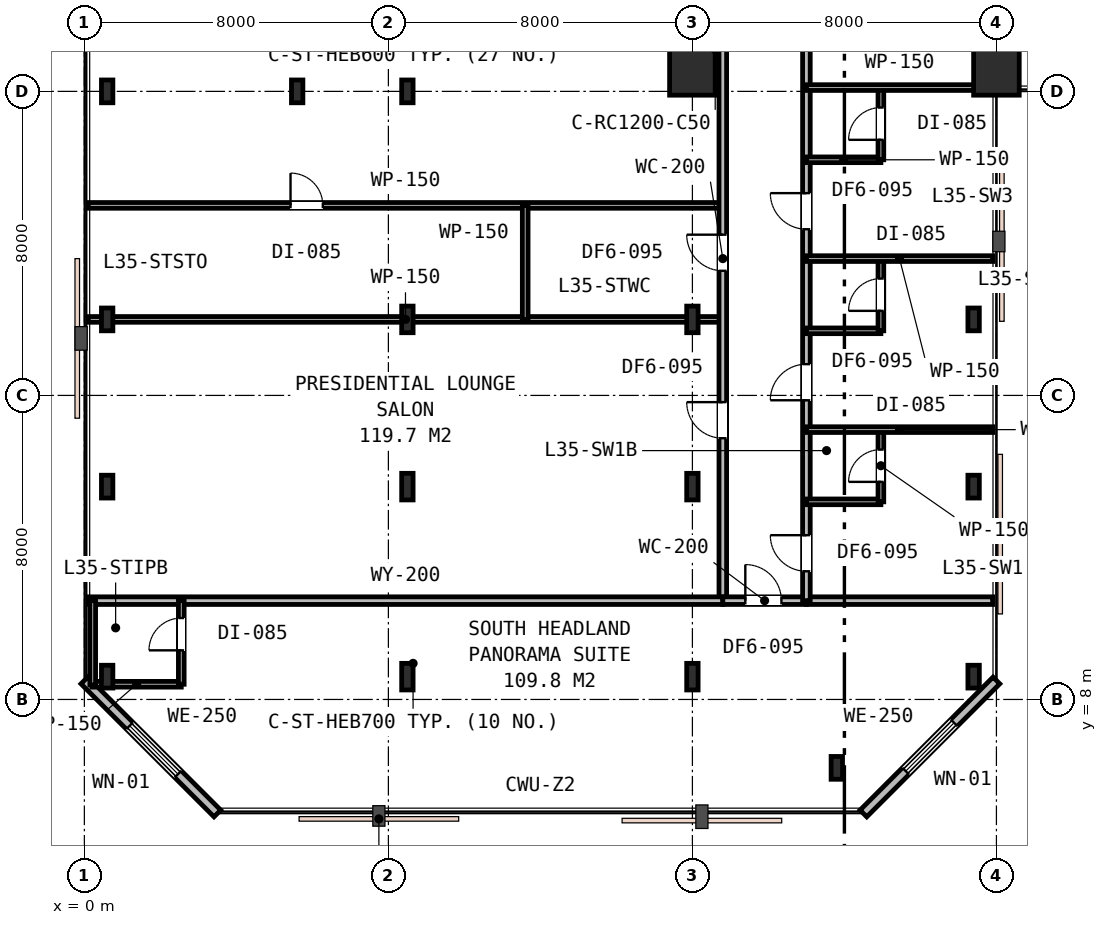
"""IFC4 building model, lengths in metres.
Left out: names, types, materials, properties, quantities, classifications, styles, units other than length and angle.
Written with IfcOpenShell. Run it as: python <this file> out.ifc"""

import sys

from ifc_helpers import new_model, si_unit, direction, frame, frame_2d, origin, origin_2d, place, context, subcontext, project, spatial, rectangle, i_section, extrude, element, fill, save


model = new_model("IFC4")
c1 = context("Model", 3, precision=1e-05, world=origin(), true_north=direction((0.0, 1.0)))
c2 = subcontext(c1, "Body", "Model", "MODEL_VIEW")
j1 = project(units=[si_unit("LENGTHUNIT", "METRE"), si_unit("PLANEANGLEUNIT", "RADIAN")], contexts=[c1])
p1 = place(None, origin())
s1 = spatial("IfcSite", under=j1, at=p1, CompositionType="ELEMENT")
p2 = place(p1, origin())
s2 = spatial("IfcBuilding", under=s1, at=p2, CompositionType="ELEMENT")
p3 = place(p2, frame((0.0, 0.0, 136.8)))
s3 = spatial("IfcBuildingStorey", under=s2, at=p3, CompositionType="ELEMENT", Elevation=136.8)
p4 = place(p3, frame((8.5, 24.0, 0.0), z_axis=(0.0, 0.0, 1.0), x_axis=(1.0, 0.0, 0.0)))
e1 = element("IfcColumn", 1, at=p4, inside=s3, PredefinedType="COLUMN", context=c2, shape_type="SweptSolid", body=[
    extrude(i_section(OverallWidth=0.3, OverallDepth=0.6, WebThickness=0.015, FlangeThickness=0.03, FilletRadius=0.027, at=origin_2d()), origin(), (0.0, 0.0, 1.0), 3.6),
])
for number, where, z_axis, x_axis in (
    (2, (16.0, 24.5, 0.0), (0.0, 0.0, 1.0), (1.0, 0.0, 0.0)),
    (3, (24.0, 24.5, 0.0), (0.0, 0.0, 1.0), (1.0, 0.0, 0.0)),
):
    element("IfcColumn", number, at=place(p3, frame(where, z_axis=z_axis, x_axis=x_axis)), inside=s3, PredefinedType="COLUMN", context=c2, shape_type="SweptSolid", body=[
        extrude(rectangle(XDim=1.2, YDim=1.2, at=origin_2d()), origin(), (0.0, 0.0, 1.0), 3.6),
    ])
for number, where, z_axis, x_axis in (
    (4, (5.6, 24.0, 0.0), (0.0, 0.0, 1.0), (1.0, 0.0, 0.0)),
    (5, (0.6, 24.0, 0.0), (0.0, 0.0, 1.0), (1.0, 0.0, 0.0)),
    (6, (0.6, 8.6, 0.0), (0.0, 0.0, 1.0), (1.0, 0.0, 0.0)),
    (7, (0.6, 13.6, 0.0), (0.0, 0.0, 1.0), (1.0, 0.0, 0.0)),
    (8, (0.6, 18.0, 0.0), (0.0, 0.0, 1.0), (1.0, 0.0, 0.0)),
    (9, (19.8, 6.2, 0.0), (0.0, 0.0, 1.0), (1.0, 0.0, 0.0)),
    (10, (23.4, 8.6, 0.0), (0.0, 0.0, 1.0), (1.0, 0.0, 0.0)),
    (11, (23.4, 13.6, 0.0), (0.0, 0.0, 1.0), (1.0, 0.0, 0.0)),
    (12, (23.4, 18.0, 0.0), (0.0, 0.0, 1.0), (1.0, 0.0, 0.0)),
):
    element("IfcColumn", number, at=place(p3, frame(where, z_axis=z_axis, x_axis=x_axis)), inside=s3, PredefinedType="COLUMN", context=c2, shape_type="SweptSolid", body=[
        extrude(i_section(OverallWidth=0.3, OverallDepth=0.6, WebThickness=0.015, FlangeThickness=0.03, FilletRadius=0.027, at=origin_2d()), origin(), (0.0, 0.0, 1.0), 3.6),
    ])
for number, where, z_axis, x_axis in (
    (13, (8.5, 8.6, 0.0), (0.0, 0.0, 1.0), (1.0, 0.0, 0.0)),
    (14, (16.0, 8.6, 0.0), (0.0, 0.0, 1.0), (1.0, 0.0, 0.0)),
    (15, (8.5, 13.6, 0.0), (0.0, 0.0, 1.0), (1.0, 0.0, 0.0)),
    (16, (16.0, 13.6, 0.0), (0.0, 0.0, 1.0), (1.0, 0.0, 0.0)),
    (17, (8.5, 18.0, 0.0), (0.0, 0.0, 1.0), (1.0, 0.0, 0.0)),
    (18, (16.0, 18.0, 0.0), (0.0, 0.0, 1.0), (1.0, 0.0, 0.0)),
):
    element("IfcColumn", number, at=place(p3, frame(where, z_axis=z_axis, x_axis=x_axis)), inside=s3, PredefinedType="COLUMN", context=c2, shape_type="SweptSolid", body=[
        extrude(i_section(OverallWidth=0.3, OverallDepth=0.7, WebThickness=0.017, FlangeThickness=0.032, FilletRadius=0.027, at=origin_2d()), origin(), (0.0, 0.0, 1.0), 3.6),
    ])
p5 = place(p3, frame((20.5, 5.0, 0.0), z_axis=(0.0, 0.0, 1.0), x_axis=(0.707106781187, 0.707106781187, 0.0)))
e19 = element("IfcWall", 19, at=p5, inside=s3, PredefinedType="STANDARD", context=c2, shape_type="SweptSolid", body=[
    extrude(rectangle(XDim=4.95, YDim=0.25, at=frame_2d((2.475, 0.0))), origin(), (0.0, 0.0, 1.0), 3.33),
])
p6 = place(p5, frame((1.575, 0.0, 0.75)))
e20 = element("IfcOpeningElement", 20, at=p6, cuts=e19, PredefinedType="OPENING", context=c2, shape_type="SweptSolid", body=[
    extrude(rectangle(XDim=1.8, YDim=1.85, at=frame_2d((0.9, 0.925))), frame((0.0, 0.135, 0.0), z_axis=(0.0, -1.0, 0.0), x_axis=(1.0, 0.0, 0.0)), (0.0, 0.0, 1.0), 0.27),
])
p7 = place(p3, frame((0.0, 8.5, 0.0), z_axis=(0.0, 0.0, 1.0), x_axis=(0.707106781187, -0.707106781187, 0.0)))
e21 = element("IfcWall", 21, at=p7, inside=s3, PredefinedType="STANDARD", context=c2, shape_type="SweptSolid", body=[
    extrude(rectangle(XDim=4.95, YDim=0.25, at=frame_2d((2.475, 0.0))), origin(), (0.0, 0.0, 1.0), 3.33),
])
p8 = place(p7, frame((1.685, 0.0, 0.75)))
e22 = element("IfcOpeningElement", 22, at=p8, cuts=e21, PredefinedType="OPENING", context=c2, shape_type="SweptSolid", body=[
    extrude(rectangle(XDim=1.8, YDim=1.85, at=frame_2d((0.9, 0.925))), frame((0.0, 0.135, 0.0), z_axis=(0.0, -1.0, 0.0), x_axis=(1.0, 0.0, 0.0)), (0.0, 0.0, 1.0), 0.27),
])
p9 = place(p3, frame((0.1, 18.0, 0.0), z_axis=(0.0, 0.0, 1.0), x_axis=(1.0, 0.0, 0.0)))
e23 = element("IfcWall", 23, at=p9, inside=s3, PredefinedType="PARTITIONING", context=c2, shape_type="SweptSolid", body=[
    extrude(rectangle(XDim=16.7, YDim=0.15, at=frame_2d((8.35, 0.0))), origin(), (0.0, 0.0, 1.0), 2.93),
])
p10 = place(p3, frame((0.1, 21.0, 0.0), z_axis=(0.0, 0.0, 1.0), x_axis=(1.0, 0.0, 0.0)))
e24 = element("IfcWall", 24, at=p10, inside=s3, PredefinedType="PARTITIONING", context=c2, shape_type="SweptSolid", body=[
    extrude(rectangle(XDim=16.7, YDim=0.15, at=frame_2d((8.35, 0.0))), origin(), (0.0, 0.0, 1.0), 2.93),
])
p11 = place(p10, frame((5.325, 0.0, 0.0)))
e25 = element("IfcOpeningElement", 25, at=p11, cuts=e24, PredefinedType="OPENING", context=c2, shape_type="SweptSolid", body=[
    extrude(rectangle(XDim=0.85, YDim=2.15, at=frame_2d((0.425, 1.075))), frame((0.0, 0.085, 0.0), z_axis=(0.0, -1.0, 0.0), x_axis=(1.0, 0.0, 0.0)), (0.0, 0.0, 1.0), 0.17),
])
p12 = place(p3, frame((11.6, 18.0, 0.0), z_axis=(0.0, 0.0, 1.0), x_axis=(0.0, 1.0, 0.0)))
e26 = element("IfcWall", 26, at=p12, inside=s3, PredefinedType="PARTITIONING", context=c2, shape_type="SweptSolid", body=[
    extrude(rectangle(XDim=3.0, YDim=0.15, at=frame_2d((1.5, 0.0))), origin(), (0.0, 0.0, 1.0), 2.93),
])
p13 = place(p3, frame((16.8, 10.6, 0.0), z_axis=(0.0, 0.0, 1.0), x_axis=(0.0, 1.0, 0.0)))
e27 = element("IfcWall", 27, at=p13, inside=s3, PredefinedType="PARTITIONING", context=c2, shape_type="SweptSolid", body=[
    extrude(rectangle(XDim=18.0, YDim=0.2, at=frame_2d((9.0, 0.0))), origin(), (0.0, 0.0, 1.0), 2.93),
])
p14 = place(p13, frame((8.679, 0.0, 0.0)))
e28 = element("IfcOpeningElement", 28, at=p14, cuts=e27, PredefinedType="OPENING", context=c2, shape_type="SweptSolid", body=[
    extrude(rectangle(XDim=0.95, YDim=2.15, at=frame_2d((0.475, 1.075))), frame((0.0, 0.11, 0.0), z_axis=(0.0, -1.0, 0.0), x_axis=(1.0, 0.0, 0.0)), (0.0, 0.0, 1.0), 0.22),
])
p15 = place(p13, frame((15.399, 0.0, 0.0)))
e29 = element("IfcOpeningElement", 29, at=p15, cuts=e27, PredefinedType="OPENING", context=c2, shape_type="SweptSolid", body=[
    extrude(rectangle(XDim=0.95, YDim=2.15, at=frame_2d((0.475, 1.075))), frame((0.0, 0.11, 0.0), z_axis=(0.0, -1.0, 0.0), x_axis=(1.0, 0.0, 0.0)), (0.0, 0.0, 1.0), 0.22),
])
p16 = place(p13, frame((4.273, 0.0, 0.0)))
e30 = element("IfcOpeningElement", 30, at=p16, cuts=e27, PredefinedType="OPENING", context=c2, shape_type="SweptSolid", body=[
    extrude(rectangle(XDim=0.95, YDim=2.15, at=frame_2d((0.475, 1.075))), frame((0.0, 0.11, 0.0), z_axis=(0.0, -1.0, 0.0), x_axis=(1.0, 0.0, 0.0)), (0.0, 0.0, 1.0), 0.22),
])
p17 = place(p3, frame((0.1, 10.6, 0.0), z_axis=(0.0, 0.0, 1.0), x_axis=(1.0, 0.0, 0.0)))
e31 = element("IfcWall", 31, at=p17, inside=s3, PredefinedType="PARTITIONING", context=c2, shape_type="SweptSolid", body=[
    extrude(rectangle(XDim=16.7, YDim=0.2, at=frame_2d((8.35, 0.0))), origin(), (0.0, 0.0, 1.0), 2.93),
])
p18 = place(p3, frame((19.0, 10.6, 0.0), z_axis=(0.0, 0.0, 1.0), x_axis=(1.0, 0.0, 0.0)))
e32 = element("IfcWall", 32, at=p18, inside=s3, PredefinedType="PARTITIONING", context=c2, shape_type="SweptSolid", body=[
    extrude(rectangle(XDim=4.9, YDim=0.2, at=frame_2d((2.45, 0.0))), origin(), (0.0, 0.0, 1.0), 2.96),
])
p19 = place(p3, frame((16.8, 10.6, 0.0), z_axis=(0.0, 0.0, 1.0), x_axis=(1.0, 0.0, 0.0)))
e33 = element("IfcWall", 33, at=p19, inside=s3, PredefinedType="PARTITIONING", context=c2, shape_type="SweptSolid", body=[
    extrude(rectangle(XDim=2.2, YDim=0.2, at=frame_2d((1.1, 0.0))), origin(), (0.0, 0.0, 1.0), 2.96),
])
p20 = place(p19, frame((0.593, 0.0, 0.0)))
e34 = element("IfcOpeningElement", 34, at=p20, cuts=e33, PredefinedType="OPENING", context=c2, shape_type="SweptSolid", body=[
    extrude(rectangle(XDim=0.95, YDim=2.15, at=frame_2d((0.475, 1.075))), frame((0.0, 0.11, 0.0), z_axis=(0.0, -1.0, 0.0), x_axis=(1.0, 0.0, 0.0)), (0.0, 0.0, 1.0), 0.22),
])
p21 = place(p3, frame((0.2, 8.4, 0.0), z_axis=(0.0, 0.0, 1.0), x_axis=(1.0, 0.0, 0.0)))
e35 = element("IfcWall", 35, at=p21, inside=s3, PredefinedType="PARTITIONING", context=c2, shape_type="SweptSolid", body=[
    extrude(rectangle(XDim=2.35, YDim=0.15, at=frame_2d((1.175, 0.0))), origin(), (0.0, 0.0, 1.0), 2.93),
])
p22 = place(p3, frame((2.55, 8.4, 0.0), z_axis=(0.0, 0.0, 1.0), x_axis=(0.0, 1.0, 0.0)))
e36 = element("IfcWall", 36, at=p22, inside=s3, PredefinedType="PARTITIONING", context=c2, shape_type="SweptSolid", body=[
    extrude(rectangle(XDim=2.2, YDim=0.15, at=frame_2d((1.1, 0.0))), origin(), (0.0, 0.0, 1.0), 2.93),
])
p23 = place(p22, frame((0.892, 0.0, 0.0)))
e37 = element("IfcOpeningElement", 37, at=p23, cuts=e36, PredefinedType="OPENING", context=c2, shape_type="SweptSolid", body=[
    extrude(rectangle(XDim=0.85, YDim=2.15, at=frame_2d((0.425, 1.075))), frame((0.0, 0.085, 0.0), z_axis=(0.0, -1.0, 0.0), x_axis=(1.0, 0.0, 0.0)), (0.0, 0.0, 1.0), 0.17),
])
p24 = place(p3, frame((0.22, 8.38, 0.0), z_axis=(0.0, 0.0, 1.0), x_axis=(0.0, 1.0, 0.0)))
e38 = element("IfcWall", 38, at=p24, inside=s3, PredefinedType="PARTITIONING", context=c2, shape_type="SweptSolid", body=[
    extrude(rectangle(XDim=2.22, YDim=0.15, at=frame_2d((1.11, 0.0))), origin(), (0.0, 0.0, 1.0), 2.93),
])
p25 = place(p3, frame((19.0, 10.6, 0.0), z_axis=(0.0, 0.0, 1.0), x_axis=(0.0, 1.0, 0.0)))
e39 = element("IfcWall", 39, at=p25, inside=s3, PredefinedType="PARTITIONING", context=c2, shape_type="SweptSolid", body=[
    extrude(rectangle(XDim=18.0, YDim=0.2, at=frame_2d((9.0, 0.0))), origin(), (0.0, 0.0, 1.0), 2.93),
])
p26 = place(p25, frame((0.772, 0.0, 0.0)))
e40 = element("IfcOpeningElement", 40, at=p26, cuts=e39, PredefinedType="OPENING", context=c2, shape_type="SweptSolid", body=[
    extrude(rectangle(XDim=0.95, YDim=2.15, at=frame_2d((0.475, 1.075))), frame((0.0, 0.11, 0.0), z_axis=(0.0, -1.0, 0.0), x_axis=(1.0, 0.0, 0.0)), (0.0, 0.0, 1.0), 0.22),
])
p27 = place(p25, frame((5.272, 0.0, 0.0)))
e41 = element("IfcOpeningElement", 41, at=p27, cuts=e39, PredefinedType="OPENING", context=c2, shape_type="SweptSolid", body=[
    extrude(rectangle(XDim=0.95, YDim=2.15, at=frame_2d((0.475, 1.075))), frame((0.0, 0.11, 0.0), z_axis=(0.0, -1.0, 0.0), x_axis=(1.0, 0.0, 0.0)), (0.0, 0.0, 1.0), 0.22),
])
p28 = place(p25, frame((9.773, 0.0, 0.0)))
e42 = element("IfcOpeningElement", 42, at=p28, cuts=e39, PredefinedType="OPENING", context=c2, shape_type="SweptSolid", body=[
    extrude(rectangle(XDim=0.95, YDim=2.15, at=frame_2d((0.475, 1.075))), frame((0.0, 0.11, 0.0), z_axis=(0.0, -1.0, 0.0), x_axis=(1.0, 0.0, 0.0)), (0.0, 0.0, 1.0), 0.22),
])
p29 = place(p25, frame((15.275, 0.0, 0.0)))
e43 = element("IfcOpeningElement", 43, at=p29, cuts=e39, PredefinedType="OPENING", context=c2, shape_type="SweptSolid", body=[
    extrude(rectangle(XDim=0.95, YDim=2.15, at=frame_2d((0.475, 1.075))), frame((0.0, 0.11, 0.0), z_axis=(0.0, -1.0, 0.0), x_axis=(1.0, 0.0, 0.0)), (0.0, 0.0, 1.0), 0.22),
])
p30 = place(p3, frame((19.0, 13.2, 0.0), z_axis=(0.0, 0.0, 1.0), x_axis=(1.0, 0.0, 0.0)))
e44 = element("IfcWall", 44, at=p30, inside=s3, PredefinedType="PARTITIONING", context=c2, shape_type="SweptSolid", body=[
    extrude(rectangle(XDim=1.96, YDim=0.15, at=frame_2d((0.98, 0.0))), origin(), (0.0, 0.0, 1.0), 2.93),
])
p31 = place(p3, frame((20.96, 13.2, 0.0), z_axis=(0.0, 0.0, 1.0), x_axis=(0.0, 1.0, 0.0)))
e45 = element("IfcWall", 45, at=p31, inside=s3, PredefinedType="PARTITIONING", context=c2, shape_type="SweptSolid", body=[
    extrude(rectangle(XDim=1.9, YDim=0.15, at=frame_2d((0.95, 0.0))), origin(), (0.0, 0.0, 1.0), 2.93),
])
p32 = place(p31, frame((0.525, 0.0, 0.0)))
e46 = element("IfcOpeningElement", 46, at=p32, cuts=e45, PredefinedType="OPENING", context=c2, shape_type="SweptSolid", body=[
    extrude(rectangle(XDim=0.85, YDim=2.15, at=frame_2d((0.425, 1.075))), frame((0.0, 0.085, 0.0), z_axis=(0.0, -1.0, 0.0), x_axis=(1.0, 0.0, 0.0)), (0.0, 0.0, 1.0), 0.17),
])
p33 = place(p3, frame((19.0, 15.1, 0.0), z_axis=(0.0, 0.0, 1.0), x_axis=(1.0, 0.0, 0.0)))
e47 = element("IfcWall", 47, at=p33, inside=s3, PredefinedType="PARTITIONING", context=c2, shape_type="SweptSolid", body=[
    extrude(rectangle(XDim=4.9, YDim=0.15, at=frame_2d((2.45, 0.0))), origin(), (0.0, 0.0, 1.0), 2.96),
])
p34 = place(p3, frame((19.0, 17.7, 0.0), z_axis=(0.0, 0.0, 1.0), x_axis=(1.0, 0.0, 0.0)))
e48 = element("IfcWall", 48, at=p34, inside=s3, PredefinedType="PARTITIONING", context=c2, shape_type="SweptSolid", body=[
    extrude(rectangle(XDim=1.96, YDim=0.15, at=frame_2d((0.98, 0.0))), origin(), (0.0, 0.0, 1.0), 2.93),
])
p35 = place(p3, frame((20.96, 17.7, 0.0), z_axis=(0.0, 0.0, 1.0), x_axis=(0.0, 1.0, 0.0)))
e49 = element("IfcWall", 49, at=p35, inside=s3, PredefinedType="PARTITIONING", context=c2, shape_type="SweptSolid", body=[
    extrude(rectangle(XDim=1.9, YDim=0.15, at=frame_2d((0.95, 0.0))), origin(), (0.0, 0.0, 1.0), 2.93),
])
p36 = place(p35, frame((0.525, 0.0, 0.0)))
e50 = element("IfcOpeningElement", 50, at=p36, cuts=e49, PredefinedType="OPENING", context=c2, shape_type="SweptSolid", body=[
    extrude(rectangle(XDim=0.85, YDim=2.15, at=frame_2d((0.425, 1.075))), frame((0.0, 0.085, 0.0), z_axis=(0.0, -1.0, 0.0), x_axis=(1.0, 0.0, 0.0)), (0.0, 0.0, 1.0), 0.17),
])
p37 = place(p3, frame((19.0, 19.6, 0.0), z_axis=(0.0, 0.0, 1.0), x_axis=(1.0, 0.0, 0.0)))
e51 = element("IfcWall", 51, at=p37, inside=s3, PredefinedType="PARTITIONING", context=c2, shape_type="SweptSolid", body=[
    extrude(rectangle(XDim=4.9, YDim=0.15, at=frame_2d((2.45, 0.0))), origin(), (0.0, 0.0, 1.0), 3.33),
])
p38 = place(p3, frame((19.0, 22.2, 0.0), z_axis=(0.0, 0.0, 1.0), x_axis=(1.0, 0.0, 0.0)))
e52 = element("IfcWall", 52, at=p38, inside=s3, PredefinedType="PARTITIONING", context=c2, shape_type="SweptSolid", body=[
    extrude(rectangle(XDim=1.96, YDim=0.15, at=frame_2d((0.98, 0.0))), origin(), (0.0, 0.0, 1.0), 3.33),
])
p39 = place(p3, frame((20.96, 22.2, 0.0), z_axis=(0.0, 0.0, 1.0), x_axis=(0.0, 1.0, 0.0)))
e53 = element("IfcWall", 53, at=p39, inside=s3, PredefinedType="PARTITIONING", context=c2, shape_type="SweptSolid", body=[
    extrude(rectangle(XDim=1.9, YDim=0.15, at=frame_2d((0.95, 0.0))), origin(), (0.0, 0.0, 1.0), 2.93),
])
p40 = place(p39, frame((0.525, 0.0, 0.0)))
e54 = element("IfcOpeningElement", 54, at=p40, cuts=e53, PredefinedType="OPENING", context=c2, shape_type="SweptSolid", body=[
    extrude(rectangle(XDim=0.85, YDim=2.15, at=frame_2d((0.425, 1.075))), frame((0.0, 0.085, 0.0), z_axis=(0.0, -1.0, 0.0), x_axis=(1.0, 0.0, 0.0)), (0.0, 0.0, 1.0), 0.17),
])
p41 = place(p3, frame((19.0, 24.1, 0.0), z_axis=(0.0, 0.0, 1.0), x_axis=(1.0, 0.0, 0.0)))
e55 = element("IfcWall", 55, at=p41, inside=s3, PredefinedType="PARTITIONING", context=c2, shape_type="SweptSolid", body=[
    extrude(rectangle(XDim=4.9, YDim=0.15, at=frame_2d((2.45, 0.0))), origin(), (0.0, 0.0, 1.0), 2.93),
])
p42 = place(p6, origin())
e56 = element("IfcWindow", 56, at=p42, inside=s3, PartitioningType="SINGLE_PANEL", PredefinedType="WINDOW", context=c2, shape_type="SweptSolid", body=[
    extrude(rectangle(XDim=1.8, YDim=1.85, at=frame_2d((0.9, 0.925))), frame((0.0, 0.03, 0.0), z_axis=(0.0, -1.0, 0.0), x_axis=(1.0, 0.0, 0.0)), (0.0, 0.0, 1.0), 0.06),
])
fill(e20, e56)
p43 = place(p8, origin())
e57 = element("IfcWindow", 57, at=p43, inside=s3, PartitioningType="SINGLE_PANEL", PredefinedType="WINDOW", context=c2, shape_type="SweptSolid", body=[
    extrude(rectangle(XDim=1.8, YDim=1.85, at=frame_2d((0.9, 0.925))), frame((0.0, 0.03, 0.0), z_axis=(0.0, -1.0, 0.0), x_axis=(1.0, 0.0, 0.0)), (0.0, 0.0, 1.0), 0.06),
])
fill(e22, e57)
p44 = place(p14, origin())
e58 = element("IfcDoor", 58, at=p44, inside=s3, OperationType="SINGLE_SWING_RIGHT", PredefinedType="DOOR", context=c2, shape_type="SweptSolid", body=[
    extrude(rectangle(XDim=0.95, YDim=2.15, at=frame_2d((0.475, 1.075))), frame((0.0, 0.025, 0.0), z_axis=(0.0, -1.0, 0.0), x_axis=(1.0, 0.0, 0.0)), (0.0, 0.0, 1.0), 0.05),
])
fill(e28, e58)
p45 = place(p11, origin())
e59 = element("IfcDoor", 59, at=p45, inside=s3, OperationType="SINGLE_SWING_LEFT", PredefinedType="DOOR", context=c2, shape_type="SweptSolid", body=[
    extrude(rectangle(XDim=0.85, YDim=2.15, at=frame_2d((0.425, 1.075))), frame((0.0, 0.025, 0.0), z_axis=(0.0, -1.0, 0.0), x_axis=(1.0, 0.0, 0.0)), (0.0, 0.0, 1.0), 0.05),
])
fill(e25, e59)
p46 = place(p16, origin())
e60 = element("IfcDoor", 60, at=p46, inside=s3, OperationType="SINGLE_SWING_RIGHT", PredefinedType="DOOR", context=c2, shape_type="SweptSolid", body=[
    extrude(rectangle(XDim=0.95, YDim=2.15, at=frame_2d((0.475, 1.075))), frame((0.0, 0.025, 0.0), z_axis=(0.0, -1.0, 0.0), x_axis=(1.0, 0.0, 0.0)), (0.0, 0.0, 1.0), 0.05),
])
fill(e30, e60)
p47 = place(p20, origin())
e61 = element("IfcDoor", 61, at=p47, inside=s3, OperationType="SINGLE_SWING_LEFT", PredefinedType="DOOR", context=c2, shape_type="SweptSolid", body=[
    extrude(rectangle(XDim=0.95, YDim=2.15, at=frame_2d((0.475, 1.075))), frame((0.0, 0.025, 0.0), z_axis=(0.0, -1.0, 0.0), x_axis=(1.0, 0.0, 0.0)), (0.0, 0.0, 1.0), 0.05),
])
fill(e34, e61)
p48 = place(p23, origin())
e62 = element("IfcDoor", 62, at=p48, inside=s3, OperationType="SINGLE_SWING_LEFT", PredefinedType="DOOR", context=c2, shape_type="SweptSolid", body=[
    extrude(rectangle(XDim=0.85, YDim=2.15, at=frame_2d((0.425, 1.075))), frame((0.0, 0.025, 0.0), z_axis=(0.0, -1.0, 0.0), x_axis=(1.0, 0.0, 0.0)), (0.0, 0.0, 1.0), 0.05),
])
fill(e37, e62)
p49 = place(p26, origin())
e63 = element("IfcDoor", 63, at=p49, inside=s3, OperationType="SINGLE_SWING_RIGHT", PredefinedType="DOOR", context=c2, shape_type="SweptSolid", body=[
    extrude(rectangle(XDim=0.95, YDim=2.15, at=frame_2d((0.475, 1.075))), frame((0.0, 0.025, 0.0), z_axis=(0.0, -1.0, 0.0), x_axis=(1.0, 0.0, 0.0)), (0.0, 0.0, 1.0), 0.05),
])
fill(e40, e63)
p50 = place(p32, origin())
e64 = element("IfcDoor", 64, at=p50, inside=s3, OperationType="SINGLE_SWING_LEFT", PredefinedType="DOOR", context=c2, shape_type="SweptSolid", body=[
    extrude(rectangle(XDim=0.85, YDim=2.15, at=frame_2d((0.425, 1.075))), frame((0.0, 0.025, 0.0), z_axis=(0.0, -1.0, 0.0), x_axis=(1.0, 0.0, 0.0)), (0.0, 0.0, 1.0), 0.05),
])
fill(e46, e64)
p51 = place(p27, origin())
e65 = element("IfcDoor", 65, at=p51, inside=s3, OperationType="SINGLE_SWING_LEFT", PredefinedType="DOOR", context=c2, shape_type="SweptSolid", body=[
    extrude(rectangle(XDim=0.95, YDim=2.15, at=frame_2d((0.475, 1.075))), frame((0.0, 0.025, 0.0), z_axis=(0.0, -1.0, 0.0), x_axis=(1.0, 0.0, 0.0)), (0.0, 0.0, 1.0), 0.05),
])
fill(e41, e65)
p52 = place(p36, origin())
e66 = element("IfcDoor", 66, at=p52, inside=s3, OperationType="SINGLE_SWING_LEFT", PredefinedType="DOOR", context=c2, shape_type="SweptSolid", body=[
    extrude(rectangle(XDim=0.85, YDim=2.15, at=frame_2d((0.425, 1.075))), frame((0.0, 0.025, 0.0), z_axis=(0.0, -1.0, 0.0), x_axis=(1.0, 0.0, 0.0)), (0.0, 0.0, 1.0), 0.05),
])
fill(e50, e66)
p53 = place(p28, origin())
e67 = element("IfcDoor", 67, at=p53, inside=s3, OperationType="SINGLE_SWING_RIGHT", PredefinedType="DOOR", context=c2, shape_type="SweptSolid", body=[
    extrude(rectangle(XDim=0.95, YDim=2.15, at=frame_2d((0.475, 1.075))), frame((0.0, 0.025, 0.0), z_axis=(0.0, -1.0, 0.0), x_axis=(1.0, 0.0, 0.0)), (0.0, 0.0, 1.0), 0.05),
])
fill(e42, e67)
p54 = place(p40, origin())
e68 = element("IfcDoor", 68, at=p54, inside=s3, OperationType="SINGLE_SWING_LEFT", PredefinedType="DOOR", context=c2, shape_type="SweptSolid", body=[
    extrude(rectangle(XDim=0.85, YDim=2.15, at=frame_2d((0.425, 1.075))), frame((0.0, 0.025, 0.0), z_axis=(0.0, -1.0, 0.0), x_axis=(1.0, 0.0, 0.0)), (0.0, 0.0, 1.0), 0.05),
])
fill(e54, e68)
save(model, sys.argv[1])
